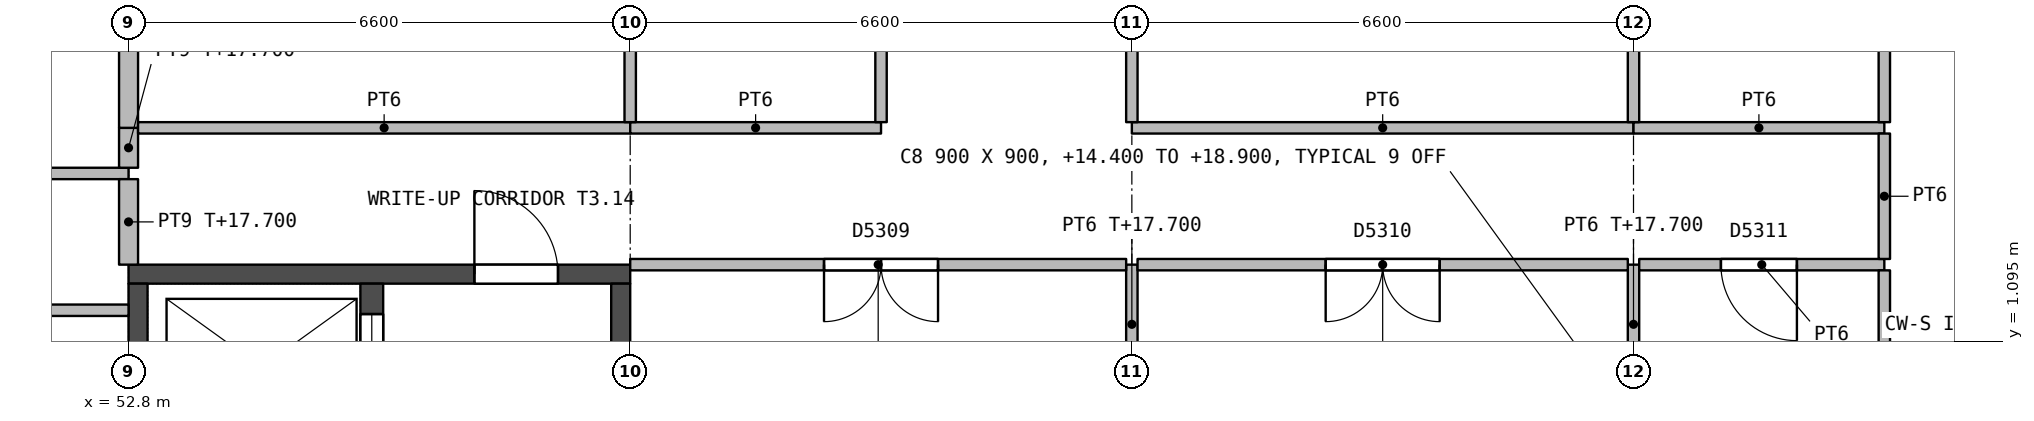
"""IFC4 building model, lengths in metres.
Left out: names, types, materials, properties, quantities, classifications, styles, units other than length and angle.
Written with IfcOpenShell. Run it as: python <this file> out.ifc"""

import sys

from ifc_helpers import new_model, si_unit, direction, frame, frame_2d, origin, place, context, subcontext, project, spatial, rectangle, extrude, element, fill, save


model = new_model("IFC4")
c1 = context("Model", 3, precision=1e-05, world=origin(), true_north=direction((0.0, 1.0)))
c2 = subcontext(c1, "Body", "Model", "MODEL_VIEW")
j1 = project(units=[si_unit("LENGTHUNIT", "METRE"), si_unit("PLANEANGLEUNIT", "RADIAN")], contexts=[c1])
p1 = place(None, origin())
s1 = spatial("IfcSite", under=j1, at=p1, CompositionType="ELEMENT")
p2 = place(p1, origin())
s2 = spatial("IfcBuilding", under=s1, at=p2, CompositionType="ELEMENT")
p3 = place(p2, frame((0.0, 0.0, 14.4)))
s3 = spatial("IfcBuildingStorey", under=s2, at=p3, CompositionType="ELEMENT", Elevation=14.4)
p4 = place(p3, frame((59.4, 1.975, 0.0), z_axis=(0.0, 0.0, 1.0), x_axis=(-1.0, 0.0, 0.0)))
e1 = element("IfcWall", 1, at=p4, inside=s3, PredefinedType="SHEAR", context=c2, shape_type="SweptSolid", body=[
    extrude(rectangle(XDim=6.6, YDim=0.25, at=frame_2d((3.3, 0.0))), origin(), (0.0, 0.0, 1.0), 4.2),
])
p5 = place(p4, frame((0.95, 0.0, 0.0)))
e2 = element("IfcOpeningElement", 2, at=p5, cuts=e1, PredefinedType="OPENING", context=c2, shape_type="SweptSolid", body=[
    extrude(rectangle(XDim=1.1, YDim=2.1, at=frame_2d((0.55, 1.05))), frame((0.0, 0.135, 0.0), z_axis=(0.0, -1.0, 0.0), x_axis=(1.0, 0.0, 0.0)), (0.0, 0.0, 1.0), 0.27),
])
for number, where, z_axis, x_axis in (
    (3, (59.275, 1.85, 0.0), (0.0, 0.0, 1.0), (0.0, -1.0, 0.0)),
    (4, (52.925, 1.85, 0.0), (0.0, 0.0, 1.0), (0.0, -1.0, 0.0)),
):
    element("IfcWall", number, at=place(p3, frame(where, z_axis=z_axis, x_axis=x_axis)), inside=s3, PredefinedType="SHEAR", context=c2, shape_type="SweptSolid", body=[
        extrude(rectangle(XDim=9.4, YDim=0.25, at=frame_2d((4.7, 0.0))), origin(), (0.0, 0.0, 1.0), 4.2),
    ])
p6 = place(p3, frame((56.0, 1.85, 0.0), z_axis=(0.0, 0.0, 1.0), x_axis=(0.0, -1.0, 0.0)))
e5 = element("IfcWall", 5, at=p6, inside=s3, PredefinedType="SHEAR", context=c2, shape_type="SweptSolid", body=[
    extrude(rectangle(XDim=6.35, YDim=0.3, at=frame_2d((3.175, 0.0))), origin(), (0.0, 0.0, 1.0), 4.2),
])
p7 = place(p6, frame((3.925, 0.0, 0.0)))
e6 = element("IfcOpeningElement", 6, at=p7, cuts=e5, PredefinedType="OPENING", context=c2, shape_type="SweptSolid", body=[
    extrude(rectangle(XDim=0.9, YDim=2.1, at=frame_2d((0.45, 1.05))), frame((0.0, 0.16, 0.0), z_axis=(0.0, -1.0, 0.0), x_axis=(1.0, 0.0, 0.0)), (0.0, 0.0, 1.0), 0.32),
])
p8 = place(p6, frame((0.4, 0.0, 0.0)))
e7 = element("IfcOpeningElement", 7, at=p8, cuts=e5, PredefinedType="OPENING", context=c2, shape_type="SweptSolid", body=[
    extrude(rectangle(XDim=1.4, YDim=2.4, at=frame_2d((0.7, 1.2))), frame((0.0, 0.16, 0.0), z_axis=(0.0, -1.0, 0.0), x_axis=(1.0, 0.0, 0.0)), (0.0, 0.0, 1.0), 0.32),
])
p9 = place(p3, frame((52.8, 1.5, 0.0), z_axis=(0.0, 0.0, 1.0), x_axis=(-1.0, 0.0, 0.0)))
e8 = element("IfcWall", 8, at=p9, inside=s3, PredefinedType="PARTITIONING", context=c2, shape_type="SweptSolid", body=[
    extrude(rectangle(XDim=6.525, YDim=0.15, at=frame_2d((3.262, 0.0))), origin(), (0.0, 0.0, 1.0), 4.2),
])
p10 = place(p9, frame((2.55, 0.0, 0.0)))
e9 = element("IfcOpeningElement", 9, at=p10, cuts=e8, PredefinedType="OPENING", context=c2, shape_type="SweptSolid", body=[
    extrude(rectangle(XDim=1.5, YDim=2.1, at=frame_2d((0.75, 1.05))), frame((0.0, 0.085, 0.0), z_axis=(0.0, -1.0, 0.0), x_axis=(1.0, 0.0, 0.0)), (0.0, 0.0, 1.0), 0.17),
])
p11 = place(p3, frame((52.8, 3.3, 0.0), z_axis=(0.0, 0.0, 1.0), x_axis=(-1.0, 0.0, 0.0)))
e10 = element("IfcWall", 10, at=p11, inside=s3, PredefinedType="PARTITIONING", context=c2, shape_type="SweptSolid", body=[
    extrude(rectangle(XDim=6.6, YDim=0.15, at=frame_2d((3.3, 0.0))), origin(), (0.0, 0.0, 1.0), 3.6),
])
p12 = place(p3, frame((52.8, 2.1, 0.0), z_axis=(0.0, 0.0, 1.0), x_axis=(0.0, 1.0, 0.0)))
e11 = element("IfcWall", 11, at=p12, inside=s3, PredefinedType="PARTITIONING", context=c2, shape_type="SweptSolid", body=[
    extrude(rectangle(XDim=1.125, YDim=0.25, at=frame_2d((0.562, 0.0))), origin(), (0.0, 0.0, 1.0), 3.3),
])
p13 = place(p3, frame((52.8, 3.375, 0.0), z_axis=(0.0, 0.0, 1.0), x_axis=(0.0, 1.0, 0.0)))
e12 = element("IfcWall", 12, at=p13, inside=s3, PredefinedType="PARTITIONING", context=c2, shape_type="SweptSolid", body=[
    extrude(rectangle(XDim=0.525, YDim=0.25, at=frame_2d((0.262, 0.0))), origin(), (0.0, 0.0, 1.0), 3.3),
])
p14 = place(p3, frame((52.8, 3.9, 0.0), z_axis=(0.0, 0.0, 1.0), x_axis=(0.0, 1.0, 0.0)))
e13 = element("IfcWall", 13, at=p14, inside=s3, PredefinedType="PARTITIONING", context=c2, shape_type="SweptSolid", body=[
    extrude(rectangle(XDim=5.55, YDim=0.25, at=frame_2d((2.775, 0.0))), origin(), (0.0, 0.0, 1.0), 3.3),
])
p15 = place(p3, frame((66.0, 0.45, 0.0), z_axis=(0.0, 0.0, 1.0), x_axis=(0.0, 1.0, 0.0)))
e14 = element("IfcWall", 14, at=p15, inside=s3, PredefinedType="PARTITIONING", context=c2, shape_type="SweptSolid", body=[
    extrude(rectangle(XDim=1.65, YDim=0.15, at=frame_2d((0.825, 0.0))), origin(), (0.0, 0.0, 1.0), 3.3),
])
p16 = place(p3, frame((65.925, 2.1, 0.0), z_axis=(0.0, 0.0, 1.0), x_axis=(-1.0, 0.0, 0.0)))
e15 = element("IfcWall", 15, at=p16, inside=s3, PredefinedType="PARTITIONING", context=c2, shape_type="SweptSolid", body=[
    extrude(rectangle(XDim=6.525, YDim=0.15, at=frame_2d((3.262, 0.0))), origin(), (0.0, 0.0, 1.0), 4.2),
])
p17 = place(p16, frame((2.475, 0.0, 0.0)))
e16 = element("IfcOpeningElement", 16, at=p17, cuts=e15, PredefinedType="OPENING", context=c2, shape_type="SweptSolid", body=[
    extrude(rectangle(XDim=1.5, YDim=2.1, at=frame_2d((0.75, 1.05))), frame((0.0, 0.085, 0.0), z_axis=(0.0, -1.0, 0.0), x_axis=(1.0, 0.0, 0.0)), (0.0, 0.0, 1.0), 0.17),
])
p18 = place(p3, frame((72.6, 0.45, 0.0), z_axis=(0.0, 0.0, 1.0), x_axis=(0.0, 1.0, 0.0)))
e17 = element("IfcWall", 17, at=p18, inside=s3, PredefinedType="PARTITIONING", context=c2, shape_type="SweptSolid", body=[
    extrude(rectangle(XDim=1.65, YDim=0.15, at=frame_2d((0.825, 0.0))), origin(), (0.0, 0.0, 1.0), 3.3),
])
p19 = place(p3, frame((72.525, 2.1, 0.0), z_axis=(0.0, 0.0, 1.0), x_axis=(-1.0, 0.0, 0.0)))
e18 = element("IfcWall", 18, at=p19, inside=s3, PredefinedType="PARTITIONING", context=c2, shape_type="SweptSolid", body=[
    extrude(rectangle(XDim=6.45, YDim=0.15, at=frame_2d((3.225, 0.0))), origin(), (0.0, 0.0, 1.0), 4.2),
])
p20 = place(p19, frame((2.475, 0.0, 0.0)))
e19 = element("IfcOpeningElement", 19, at=p20, cuts=e18, PredefinedType="OPENING", context=c2, shape_type="SweptSolid", body=[
    extrude(rectangle(XDim=1.5, YDim=2.1, at=frame_2d((0.75, 1.05))), frame((0.0, 0.085, 0.0), z_axis=(0.0, -1.0, 0.0), x_axis=(1.0, 0.0, 0.0)), (0.0, 0.0, 1.0), 0.17),
])
p21 = place(p3, frame((75.9, 2.1, 0.0), z_axis=(0.0, 0.0, 1.0), x_axis=(-1.0, 0.0, 0.0)))
e20 = element("IfcWall", 20, at=p21, inside=s3, PredefinedType="PARTITIONING", context=c2, shape_type="SweptSolid", body=[
    extrude(rectangle(XDim=3.225, YDim=0.15, at=frame_2d((1.612, 0.0))), origin(), (0.0, 0.0, 1.0), 4.2),
])
p22 = place(p21, frame((1.15, 0.0, 0.0)))
e21 = element("IfcOpeningElement", 21, at=p22, cuts=e20, PredefinedType="OPENING", context=c2, shape_type="SweptSolid", body=[
    extrude(rectangle(XDim=1.0, YDim=2.1, at=frame_2d((0.5, 1.05))), frame((0.0, 0.085, 0.0), z_axis=(0.0, -1.0, 0.0), x_axis=(1.0, 0.0, 0.0)), (0.0, 0.0, 1.0), 0.17),
])
p23 = place(p3, frame((75.9, -8.25, 0.0), z_axis=(0.0, 0.0, 1.0), x_axis=(0.0, 1.0, 0.0)))
e22 = element("IfcWall", 22, at=p23, inside=s3, PredefinedType="PARTITIONING", context=c2, shape_type="SweptSolid", body=[
    extrude(rectangle(XDim=10.275, YDim=0.15, at=frame_2d((5.137, 0.0))), origin(), (0.0, 0.0, 1.0), 4.2),
])
p24 = place(p3, frame((59.4, 3.9, 0.0), z_axis=(0.0, 0.0, 1.0), x_axis=(-1.0, 0.0, 0.0)))
e23 = element("IfcWall", 23, at=p24, inside=s3, PredefinedType="PARTITIONING", context=c2, shape_type="SweptSolid", body=[
    extrude(rectangle(XDim=6.475, YDim=0.15, at=frame_2d((3.237, 0.0))), origin(), (0.0, 0.0, 1.0), 4.2),
])
p25 = place(p3, frame((62.7, 3.9, 0.0), z_axis=(0.0, 0.0, 1.0), x_axis=(-1.0, 0.0, 0.0)))
e24 = element("IfcWall", 24, at=p25, inside=s3, PredefinedType="PARTITIONING", context=c2, shape_type="SweptSolid", body=[
    extrude(rectangle(XDim=3.3, YDim=0.15, at=frame_2d((1.65, 0.0))), origin(), (0.0, 0.0, 1.0), 4.2),
])
p26 = place(p3, frame((72.6, 3.9, 0.0), z_axis=(0.0, 0.0, 1.0), x_axis=(-1.0, 0.0, 0.0)))
e25 = element("IfcWall", 25, at=p26, inside=s3, PredefinedType="PARTITIONING", context=c2, shape_type="SweptSolid", body=[
    extrude(rectangle(XDim=6.6, YDim=0.15, at=frame_2d((3.3, 0.0))), origin(), (0.0, 0.0, 1.0), 4.2),
])
p27 = place(p3, frame((75.9, 3.9, 0.0), z_axis=(0.0, 0.0, 1.0), x_axis=(-1.0, 0.0, 0.0)))
e26 = element("IfcWall", 26, at=p27, inside=s3, PredefinedType="PARTITIONING", context=c2, shape_type="SweptSolid", body=[
    extrude(rectangle(XDim=3.3, YDim=0.15, at=frame_2d((1.65, 0.0))), origin(), (0.0, 0.0, 1.0), 4.2),
])
p28 = place(p3, frame((75.9, 2.175, 0.0), z_axis=(0.0, 0.0, 1.0), x_axis=(0.0, 1.0, 0.0)))
e27 = element("IfcWall", 27, at=p28, inside=s3, PredefinedType="PARTITIONING", context=c2, shape_type="SweptSolid", body=[
    extrude(rectangle(XDim=1.65, YDim=0.15, at=frame_2d((0.825, 0.0))), origin(), (0.0, 0.0, 1.0), 4.2),
])
p29 = place(p3, frame((59.4, 3.975, 0.0), z_axis=(0.0, 0.0, 1.0), x_axis=(0.0, 1.0, 0.0)))
e28 = element("IfcWall", 28, at=p29, inside=s3, PredefinedType="PARTITIONING", context=c2, shape_type="SweptSolid", body=[
    extrude(rectangle(XDim=5.475, YDim=0.15, at=frame_2d((2.737, 0.0))), origin(), (0.0, 0.0, 1.0), 3.3),
])
p30 = place(p3, frame((62.7, 9.825, 0.0), z_axis=(0.0, 0.0, 1.0), x_axis=(0.0, -1.0, 0.0)))
e29 = element("IfcWall", 29, at=p30, inside=s3, PredefinedType="PARTITIONING", context=c2, shape_type="SweptSolid", body=[
    extrude(rectangle(XDim=5.85, YDim=0.15, at=frame_2d((2.925, 0.0))), origin(), (0.0, 0.0, 1.0), 4.2),
])
p31 = place(p30, frame((2.425, 0.0, 0.0)))
e30 = element("IfcOpeningElement", 30, at=p31, cuts=e29, PredefinedType="OPENING", context=c2, shape_type="SweptSolid", body=[
    extrude(rectangle(XDim=1.0, YDim=2.1, at=frame_2d((0.5, 1.05))), frame((0.0, 0.085, 0.0), z_axis=(0.0, -1.0, 0.0), x_axis=(1.0, 0.0, 0.0)), (0.0, 0.0, 1.0), 0.17),
])
for number, where, z_axis, x_axis in (
    (31, (66.0, 3.975, 0.0), (0.0, 0.0, 1.0), (0.0, 1.0, 0.0)),
    (32, (72.6, 3.975, 0.0), (0.0, 0.0, 1.0), (0.0, 1.0, 0.0)),
):
    element("IfcWall", number, at=place(p3, frame(where, z_axis=z_axis, x_axis=x_axis)), inside=s3, PredefinedType="PARTITIONING", context=c2, shape_type="SweptSolid", body=[
        extrude(rectangle(XDim=5.475, YDim=0.15, at=frame_2d((2.737, 0.0))), origin(), (0.0, 0.0, 1.0), 3.3),
    ])
p32 = place(p3, frame((75.9, 3.975, 0.0), z_axis=(0.0, 0.0, 1.0), x_axis=(0.0, 1.0, 0.0)))
e33 = element("IfcWall", 33, at=p32, inside=s3, PredefinedType="PARTITIONING", context=c2, shape_type="SweptSolid", body=[
    extrude(rectangle(XDim=5.85, YDim=0.15, at=frame_2d((2.925, 0.0))), origin(), (0.0, 0.0, 1.0), 4.2),
])
p33 = place(p5, origin())
e34 = element("IfcDoor", 34, at=p33, inside=s3, OperationType="SINGLE_SWING_RIGHT", PredefinedType="DOOR", context=c2, shape_type="SweptSolid", body=[
    extrude(rectangle(XDim=1.1, YDim=2.1, at=frame_2d((0.55, 1.05))), frame((0.0, 0.025, 0.0), z_axis=(0.0, -1.0, 0.0), x_axis=(1.0, 0.0, 0.0)), (0.0, 0.0, 1.0), 0.05),
])
fill(e2, e34)
p34 = place(p8, origin())
e35 = element("IfcDoor", 35, at=p34, inside=s3, OperationType="DOUBLE_DOOR_SLIDING", PredefinedType="NOTDEFINED", context=c2, shape_type="SweptSolid", body=[
    extrude(rectangle(XDim=1.4, YDim=2.4, at=frame_2d((0.7, 1.2))), frame((0.0, 0.025, 0.0), z_axis=(0.0, -1.0, 0.0), x_axis=(1.0, 0.0, 0.0)), (0.0, 0.0, 1.0), 0.05),
])
fill(e7, e35)
p35 = place(p17, origin())
e36 = element("IfcDoor", 36, at=p35, inside=s3, OperationType="DOUBLE_DOOR_SINGLE_SWING", PredefinedType="DOOR", context=c2, shape_type="SweptSolid", body=[
    extrude(rectangle(XDim=1.5, YDim=2.1, at=frame_2d((0.75, 1.05))), frame((0.0, 0.027, 0.0), z_axis=(0.0, -1.0, 0.0), x_axis=(1.0, 0.0, 0.0)), (0.0, 0.0, 1.0), 0.054),
])
fill(e16, e36)
p36 = place(p20, origin())
e37 = element("IfcDoor", 37, at=p36, inside=s3, OperationType="DOUBLE_DOOR_SINGLE_SWING", PredefinedType="DOOR", context=c2, shape_type="SweptSolid", body=[
    extrude(rectangle(XDim=1.5, YDim=2.1, at=frame_2d((0.75, 1.05))), frame((0.0, 0.027, 0.0), z_axis=(0.0, -1.0, 0.0), x_axis=(1.0, 0.0, 0.0)), (0.0, 0.0, 1.0), 0.054),
])
fill(e19, e37)
p37 = place(p22, origin())
e38 = element("IfcDoor", 38, at=p37, inside=s3, OperationType="SINGLE_SWING_LEFT", PredefinedType="DOOR", context=c2, shape_type="SweptSolid", body=[
    extrude(rectangle(XDim=1.0, YDim=2.1, at=frame_2d((0.5, 1.05))), frame((0.0, 0.027, 0.0), z_axis=(0.0, -1.0, 0.0), x_axis=(1.0, 0.0, 0.0)), (0.0, 0.0, 1.0), 0.054),
])
fill(e21, e38)
save(model, sys.argv[1])
